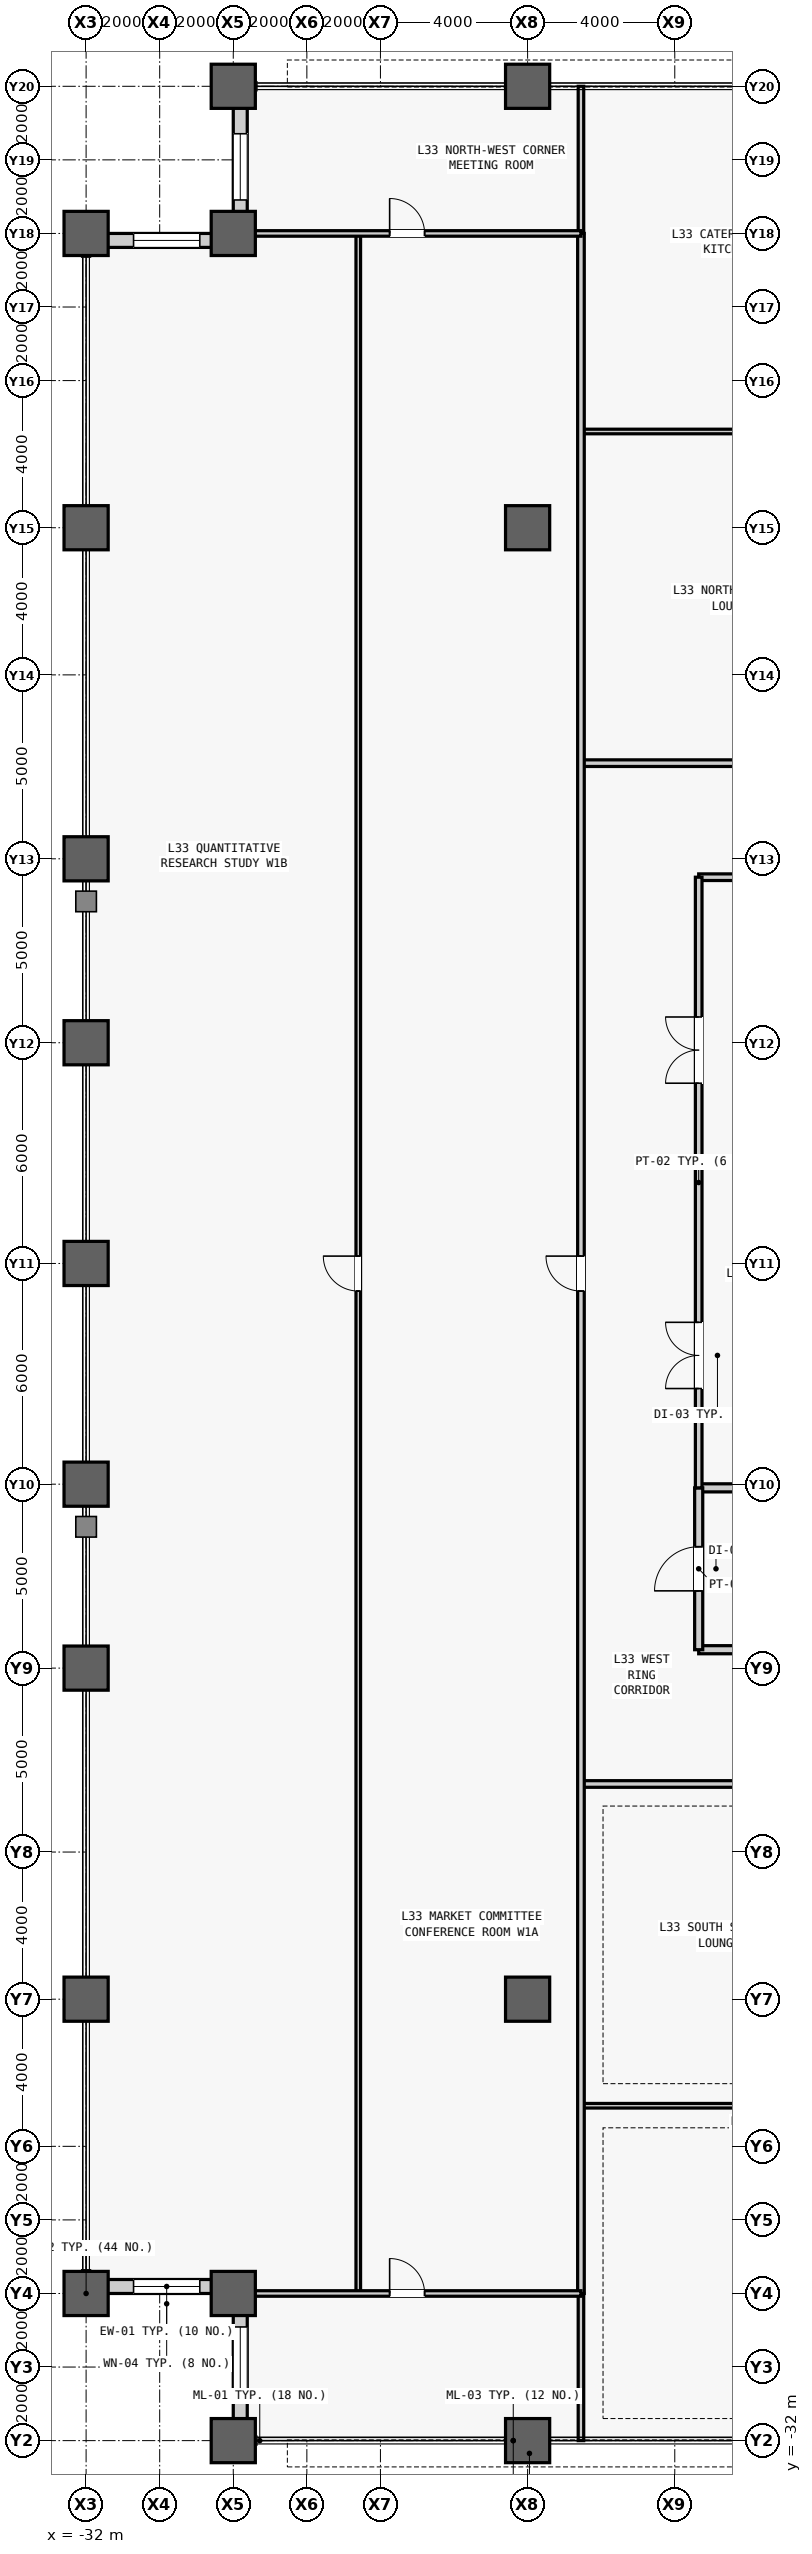
"""IFC4 building model, lengths in metres.
Left out: names, types, materials, properties, quantities, classifications, styles, units other than length and angle.
Written with IfcOpenShell. Run it as: python <this file> out.ifc"""

import sys

from ifc_helpers import new_model, si_unit, direction, frame, frame_2d, origin, origin_2d, place, context, subcontext, project, spatial, rectangle, hollow_rectangle, extrude, source, transform, mapped, element, fill, save


model = new_model("IFC4")
c1 = context("Model", 3, precision=1e-05, world=origin(), true_north=direction((0.0, 1.0)))
c2 = subcontext(c1, "Body", "Model", "MODEL_VIEW")
j1 = project(units=[si_unit("LENGTHUNIT", "METRE"), si_unit("PLANEANGLEUNIT", "RADIAN")], contexts=[c1])
p1 = place(None, origin())
s1 = spatial("IfcSite", under=j1, at=p1, CompositionType="ELEMENT")
p2 = place(p1, origin())
s2 = spatial("IfcBuilding", under=s1, at=p2, CompositionType="ELEMENT")
p3 = place(p2, frame((0.0, 0.0, 144.7)))
s3 = spatial("IfcBuildingStorey", under=s2, at=p3, CompositionType="ELEMENT", Elevation=144.7)
m1 = source(origin(), c2, "Body", "SweptSolid", [
    extrude(hollow_rectangle(XDim=1.2, YDim=1.2, WallThickness=0.07, at=origin_2d()), origin(), (0.0, 0.0, 1.0), 5.2),
])
for number, where, z_axis, x_axis in (
    (1, (-32.0, -28.0, 0.0), (0.0, 0.0, 1.0), (1.0, 0.0, 0.0)),
    (2, (-32.0, -20.0, 0.0), (0.0, 0.0, 1.0), (1.0, 0.0, 0.0)),
    (3, (-32.0, -11.0, 0.0), (0.0, 0.0, 1.0), (1.0, 0.0, 0.0)),
    (4, (-32.0, -6.0, 0.0), (0.0, 0.0, 1.0), (1.0, 0.0, 0.0)),
    (5, (-32.0, 0.0, 0.0), (0.0, 0.0, 1.0), (1.0, 0.0, 0.0)),
    (6, (-32.0, 6.0, 0.0), (0.0, 0.0, 1.0), (1.0, 0.0, 0.0)),
    (7, (-32.0, 11.0, 0.0), (0.0, 0.0, 1.0), (1.0, 0.0, 0.0)),
    (8, (-32.0, 20.0, 0.0), (0.0, 0.0, 1.0), (1.0, 0.0, 0.0)),
    (9, (-32.0, 28.0, 0.0), (0.0, 0.0, 1.0), (1.0, 0.0, 0.0)),
    (10, (-28.0, -32.0, 0.0), (0.0, 0.0, 1.0), (1.0, 0.0, 0.0)),
    (11, (-28.0, -28.0, 0.0), (0.0, 0.0, 1.0), (1.0, 0.0, 0.0)),
    (12, (-28.0, 28.0, 0.0), (0.0, 0.0, 1.0), (1.0, 0.0, 0.0)),
    (13, (-28.0, 32.0, 0.0), (0.0, 0.0, 1.0), (1.0, 0.0, 0.0)),
    (14, (-20.0, -32.0, 0.0), (0.0, 0.0, 1.0), (1.0, 0.0, 0.0)),
    (15, (-20.0, -20.0, 0.0), (0.0, 0.0, 1.0), (1.0, 0.0, 0.0)),
    (16, (-20.0, 20.0, 0.0), (0.0, 0.0, 1.0), (1.0, 0.0, 0.0)),
    (17, (-20.0, 32.0, 0.0), (0.0, 0.0, 1.0), (1.0, 0.0, 0.0)),
):
    element("IfcColumn", number, at=place(p3, frame(where, z_axis=z_axis, x_axis=x_axis)), inside=s3, PredefinedType="COLUMN", context=c2, shape_type="MappedRepresentation", body=[
        mapped(m1, transform((0.0, 0.0, 0.0), scale=1.0)),
    ])
m2 = source(origin(), c2, "Body", "SweptSolid", [
    extrude(rectangle(XDim=3.62, YDim=0.38, at=frame_2d((1.81, 0.0))), origin(), (0.0, 0.0, 1.0), 3.905),
])
p4 = place(p3, frame((-28.0, -27.81, 0.0), z_axis=(0.0, 0.0, 1.0), x_axis=(-1.0, 0.0, 0.0)))
e18 = element("IfcWall", 18, at=p4, inside=s3, PredefinedType="STANDARD", context=c2, shape_type="MappedRepresentation", body=[
    mapped(m2, transform((0.0, 0.0, 0.0), scale=1.0)),
])
m3 = source(origin(), c2, "Body", "SweptSolid", [
    extrude(rectangle(XDim=1.8, YDim=2.4, at=frame_2d((0.9, 1.2))), frame((0.0, 0.2, 0.0), z_axis=(0.0, -1.0, 0.0), x_axis=(1.0, 0.0, 0.0)), (0.0, 0.0, 1.0), 0.4),
])
p5 = place(p4, frame((0.91, 0.0, 0.7)))
e19 = element("IfcOpeningElement", 19, at=p5, cuts=e18, PredefinedType="OPENING", context=c2, shape_type="MappedRepresentation", body=[
    mapped(m3, transform((0.0, 0.0, 0.0), scale=1.0)),
])
p6 = place(p3, frame((-27.81, -31.62, 0.0), z_axis=(0.0, 0.0, 1.0), x_axis=(0.0, 1.0, 0.0)))
e20 = element("IfcWall", 20, at=p6, inside=s3, PredefinedType="STANDARD", context=c2, shape_type="MappedRepresentation", body=[
    mapped(m2, transform((0.0, 0.0, 0.0), scale=1.0)),
])
p7 = place(p6, frame((0.91, 0.0, 0.7)))
e21 = element("IfcOpeningElement", 21, at=p7, cuts=e20, PredefinedType="OPENING", context=c2, shape_type="MappedRepresentation", body=[
    mapped(m3, transform((0.0, 0.0, 0.0), scale=1.0)),
])
p8 = place(p3, frame((-27.81, 28.0, 0.0), z_axis=(0.0, 0.0, 1.0), x_axis=(0.0, 1.0, 0.0)))
e22 = element("IfcWall", 22, at=p8, inside=s3, PredefinedType="STANDARD", context=c2, shape_type="MappedRepresentation", body=[
    mapped(m2, transform((0.0, 0.0, 0.0), scale=1.0)),
])
p9 = place(p8, frame((0.91, 0.0, 0.7)))
e23 = element("IfcOpeningElement", 23, at=p9, cuts=e22, PredefinedType="OPENING", context=c2, shape_type="MappedRepresentation", body=[
    mapped(m3, transform((0.0, 0.0, 0.0), scale=1.0)),
])
p10 = place(p3, frame((-28.0, 27.81, 0.0), z_axis=(0.0, 0.0, 1.0), x_axis=(-1.0, 0.0, 0.0)))
e24 = element("IfcWall", 24, at=p10, inside=s3, PredefinedType="STANDARD", context=c2, shape_type="MappedRepresentation", body=[
    mapped(m2, transform((0.0, 0.0, 0.0), scale=1.0)),
])
p11 = place(p10, frame((0.91, 0.0, 0.7)))
e25 = element("IfcOpeningElement", 25, at=p11, cuts=e24, PredefinedType="OPENING", context=c2, shape_type="MappedRepresentation", body=[
    mapped(m3, transform((0.0, 0.0, 0.0), scale=1.0)),
])
m4 = source(origin(), c2, "Body", "SweptSolid", [
    extrude(rectangle(XDim=4.05, YDim=0.22, at=frame_2d((2.025, 0.0))), origin(), (0.0, 0.0, 1.0), 4.6),
])
p12 = place(p3, frame((-15.35, -10.5, 0.0), z_axis=(0.0, 0.0, 1.0), x_axis=(1.0, 0.0, 0.0)))
e26 = element("IfcWall", 26, at=p12, inside=s3, PredefinedType="PARTITIONING", context=c2, shape_type="MappedRepresentation", body=[
    mapped(m4, transform((0.0, 0.0, 0.0), scale=1.0)),
])
m5 = source(origin(), c2, "Body", "SweptSolid", [
    extrude(rectangle(XDim=4.05, YDim=0.22, at=frame_2d((2.025, 0.0))), origin(), (0.0, 0.0, 1.0), 2.8),
])
p13 = place(p3, frame((-15.35, -6.1, 0.0), z_axis=(0.0, 0.0, 1.0), x_axis=(1.0, 0.0, 0.0)))
e27 = element("IfcWall", 27, at=p13, inside=s3, PredefinedType="PARTITIONING", context=c2, shape_type="MappedRepresentation", body=[
    mapped(m5, transform((0.0, 0.0, 0.0), scale=1.0)),
])
m6 = source(origin(), c2, "Body", "SweptSolid", [
    extrude(rectangle(XDim=4.4, YDim=0.22, at=frame_2d((2.2, 0.0))), origin(), (0.0, 0.0, 1.0), 4.6),
])
p14 = place(p3, frame((-15.35, -10.5, 0.0), z_axis=(0.0, 0.0, 1.0), x_axis=(0.0, 1.0, 0.0)))
e28 = element("IfcWall", 28, at=p14, inside=s3, PredefinedType="PARTITIONING", context=c2, shape_type="MappedRepresentation", body=[
    mapped(m6, transform((0.0, 0.0, 0.0), scale=1.0)),
])
m7 = source(origin(), c2, "Body", "SweptSolid", [
    extrude(rectangle(XDim=1.2, YDim=2.2, at=frame_2d((0.6, 1.1))), frame((0.0, 0.12, 0.0), z_axis=(0.0, -1.0, 0.0), x_axis=(1.0, 0.0, 0.0)), (0.0, 0.0, 1.0), 0.24),
])
p15 = place(p14, frame((1.6, 0.0, 0.0)))
e29 = element("IfcOpeningElement", 29, at=p15, cuts=e28, PredefinedType="OPENING", context=c2, shape_type="MappedRepresentation", body=[
    mapped(m7, transform((0.0, 0.0, 0.0), scale=1.0)),
])
m8 = source(origin(), c2, "Body", "SweptSolid", [
    extrude(rectangle(XDim=4.05, YDim=0.18, at=frame_2d((2.025, 0.0))), origin(), (0.0, 0.0, 1.0), 4.6),
])
p16 = place(p3, frame((-15.35, 10.5, 0.0), z_axis=(0.0, 0.0, 1.0), x_axis=(1.0, 0.0, 0.0)))
e30 = element("IfcWall", 30, at=p16, inside=s3, PredefinedType="PARTITIONING", context=c2, shape_type="MappedRepresentation", body=[
    mapped(m8, transform((0.0, 0.0, 0.0), scale=1.0)),
])
m9 = source(origin(), c2, "Body", "SweptSolid", [
    extrude(rectangle(XDim=16.6, YDim=0.18, at=frame_2d((8.3, 0.0))), origin(), (0.0, 0.0, 1.0), 4.6),
])
p17 = place(p3, frame((-15.35, -6.1, 0.0), z_axis=(0.0, 0.0, 1.0), x_axis=(0.0, 1.0, 0.0)))
e31 = element("IfcWall", 31, at=p17, inside=s3, PredefinedType="PARTITIONING", context=c2, shape_type="MappedRepresentation", body=[
    mapped(m9, transform((0.0, 0.0, 0.0), scale=1.0)),
])
m10 = source(origin(), c2, "Body", "SweptSolid", [
    extrude(rectangle(XDim=1.8, YDim=2.25, at=frame_2d((0.9, 1.125))), frame((0.0, 0.1, 0.0), z_axis=(0.0, -1.0, 0.0), x_axis=(1.0, 0.0, 0.0)), (0.0, 0.0, 1.0), 0.2),
])
p18 = place(p17, frame((2.7, 0.0, 0.0)))
e32 = element("IfcOpeningElement", 32, at=p18, cuts=e31, PredefinedType="OPENING", context=c2, shape_type="MappedRepresentation", body=[
    mapped(m10, transform((0.0, 0.0, 0.0), scale=1.0)),
])
p19 = place(p17, frame((11.0, 0.0, 0.0)))
e33 = element("IfcOpeningElement", 33, at=p19, cuts=e31, PredefinedType="OPENING", context=c2, shape_type="MappedRepresentation", body=[
    mapped(m10, transform((0.0, 0.0, 0.0), scale=1.0)),
])
m11 = source(origin(), c2, "Body", "SweptSolid", [
    extrude(rectangle(XDim=13.282, YDim=0.125, at=frame_2d((6.641, 0.0))), origin(), (0.0, 0.0, 1.0), 4.6),
])
p20 = place(p3, frame((-18.55, -22.896, 0.0), z_axis=(0.0, 0.0, 1.0), x_axis=(1.0, 0.0, 0.0)))
e34 = element("IfcWall", 34, at=p20, inside=s3, PredefinedType="PARTITIONING", context=c2, shape_type="MappedRepresentation", body=[
    mapped(m11, transform((0.0, 0.0, 0.0), scale=1.0)),
])
m12 = source(origin(), c2, "Body", "SweptSolid", [
    extrude(rectangle(XDim=0.95, YDim=2.15, at=frame_2d((0.475, 1.075))), frame((0.0, 0.073, 0.0), z_axis=(0.0, -1.0, 0.0), x_axis=(1.0, 0.0, 0.0)), (0.0, 0.0, 1.0), 0.145),
])
p21 = place(p20, frame((6.166, 0.0, 0.0)))
e35 = element("IfcOpeningElement", 35, at=p21, cuts=e34, PredefinedType="OPENING", context=c2, shape_type="MappedRepresentation", body=[
    mapped(m12, transform((0.0, 0.0, 0.0), scale=1.0)),
])
m13 = source(origin(), c2, "Body", "SweptSolid", [
    extrude(rectangle(XDim=37.95, YDim=0.18, at=frame_2d((18.975, 0.0))), origin(), (0.0, 0.0, 1.0), 4.6),
])
p22 = place(p3, frame((-18.55, -14.15, 0.0), z_axis=(0.0, 0.0, 1.0), x_axis=(1.0, 0.0, 0.0)))
e36 = element("IfcWall", 36, at=p22, inside=s3, PredefinedType="PARTITIONING", context=c2, shape_type="MappedRepresentation", body=[
    mapped(m13, transform((0.0, 0.0, 0.0), scale=1.0)),
])
m14 = source(origin(), c2, "Body", "SweptSolid", [
    extrude(rectangle(XDim=1.05, YDim=2.2, at=frame_2d((0.525, 1.1))), frame((0.0, 0.1, 0.0), z_axis=(0.0, -1.0, 0.0), x_axis=(1.0, 0.0, 0.0)), (0.0, 0.0, 1.0), 0.2),
])
p23 = place(p22, frame((8.191, 0.0, 0.0)))
e37 = element("IfcOpeningElement", 37, at=p23, cuts=e36, PredefinedType="OPENING", context=c2, shape_type="MappedRepresentation", body=[
    mapped(m14, transform((0.0, 0.0, 0.0), scale=1.0)),
])
p24 = place(p22, frame((19.399, 0.0, 0.0)))
e38 = element("IfcOpeningElement", 38, at=p24, cuts=e36, PredefinedType="OPENING", context=c2, shape_type="MappedRepresentation", body=[
    mapped(m14, transform((0.0, 0.0, 0.0), scale=1.0)),
])
p25 = place(p22, frame((29.232, 0.0, 0.0)))
e39 = element("IfcOpeningElement", 39, at=p25, cuts=e36, PredefinedType="OPENING", context=c2, shape_type="MappedRepresentation", body=[
    mapped(m14, transform((0.0, 0.0, 0.0), scale=1.0)),
])
m15 = source(origin(), c2, "Body", "SweptSolid", [
    extrude(rectangle(XDim=12.144, YDim=0.125, at=frame_2d((6.072, 0.0))), origin(), (0.0, 0.0, 1.0), 4.6),
])
p26 = place(p3, frame((-18.55, 22.616, 0.0), z_axis=(0.0, 0.0, 1.0), x_axis=(1.0, 0.0, 0.0)))
e40 = element("IfcWall", 40, at=p26, inside=s3, PredefinedType="PARTITIONING", context=c2, shape_type="MappedRepresentation", body=[
    mapped(m15, transform((0.0, 0.0, 0.0), scale=1.0)),
])
p27 = place(p26, frame((5.597, 0.0, 0.0)))
e41 = element("IfcOpeningElement", 41, at=p27, cuts=e40, PredefinedType="OPENING", context=c2, shape_type="MappedRepresentation", body=[
    mapped(m12, transform((0.0, 0.0, 0.0), scale=1.0)),
])
p28 = place(p3, frame((-18.55, 13.6, 0.0), z_axis=(0.0, 0.0, 1.0), x_axis=(1.0, 0.0, 0.0)))
e42 = element("IfcWall", 42, at=p28, inside=s3, PredefinedType="PARTITIONING", context=c2, shape_type="MappedRepresentation", body=[
    mapped(m13, transform((0.0, 0.0, 0.0), scale=1.0)),
])
p29 = place(p28, frame((7.622, 0.0, 0.0)))
e43 = element("IfcOpeningElement", 43, at=p29, cuts=e42, PredefinedType="OPENING", context=c2, shape_type="MappedRepresentation", body=[
    mapped(m14, transform((0.0, 0.0, 0.0), scale=1.0)),
])
p30 = place(p28, frame((18.071, 0.0, 0.0)))
e44 = element("IfcOpeningElement", 44, at=p30, cuts=e42, PredefinedType="OPENING", context=c2, shape_type="MappedRepresentation", body=[
    mapped(m14, transform((0.0, 0.0, 0.0), scale=1.0)),
])
p31 = place(p28, frame((28.473, 0.0, 0.0)))
e45 = element("IfcOpeningElement", 45, at=p31, cuts=e42, PredefinedType="OPENING", context=c2, shape_type="MappedRepresentation", body=[
    mapped(m14, transform((0.0, 0.0, 0.0), scale=1.0)),
])
m16 = source(origin(), c2, "Body", "SweptSolid", [
    extrude(rectangle(XDim=4.0, YDim=0.15, at=frame_2d((2.0, 0.0))), origin(), (0.0, 0.0, 1.0), 4.6),
])
for number, where, z_axis, x_axis in (
    (46, (-18.55, -32.0, 0.0), (0.0, 0.0, 1.0), (0.0, 1.0, 0.0)),
    (47, (-18.55, 28.0, 0.0), (0.0, 0.0, 1.0), (0.0, 1.0, 0.0)),
):
    element("IfcWall", number, at=place(p3, frame(where, z_axis=z_axis, x_axis=x_axis)), inside=s3, PredefinedType="PARTITIONING", context=c2, shape_type="MappedRepresentation", body=[
        mapped(m16, transform((0.0, 0.0, 0.0), scale=1.0)),
    ])
m17 = source(origin(), c2, "Body", "SweptSolid", [
    extrude(rectangle(XDim=56.0, YDim=0.125, at=frame_2d((28.0, 0.0))), origin(), (0.0, 0.0, 1.0), 4.6),
])
p32 = place(p3, frame((-24.603, -28.0, 0.0), z_axis=(0.0, 0.0, 1.0), x_axis=(0.0, 1.0, 0.0)))
e48 = element("IfcWall", 48, at=p32, inside=s3, PredefinedType="PARTITIONING", context=c2, shape_type="MappedRepresentation", body=[
    mapped(m17, transform((0.0, 0.0, 0.0), scale=1.0)),
])
p33 = place(p32, frame((27.25, 0.0, 0.0)))
e49 = element("IfcOpeningElement", 49, at=p33, cuts=e48, PredefinedType="OPENING", context=c2, shape_type="MappedRepresentation", body=[
    mapped(m12, transform((0.0, 0.0, 0.0), scale=1.0)),
])
m18 = source(origin(), c2, "Body", "SweptSolid", [
    extrude(rectangle(XDim=56.0, YDim=0.18, at=frame_2d((28.0, 0.0))), origin(), (0.0, 0.0, 1.0), 4.6),
])
p34 = place(p3, frame((-18.55, -28.0, 0.0), z_axis=(0.0, 0.0, 1.0), x_axis=(0.0, 1.0, 0.0)))
e50 = element("IfcWall", 50, at=p34, inside=s3, PredefinedType="PARTITIONING", context=c2, shape_type="MappedRepresentation", body=[
    mapped(m18, transform((0.0, 0.0, 0.0), scale=1.0)),
])
m19 = source(origin(), c2, "Body", "SweptSolid", [
    extrude(rectangle(XDim=0.95, YDim=2.15, at=frame_2d((0.475, 1.075))), frame((0.0, 0.1, 0.0), z_axis=(0.0, -1.0, 0.0), x_axis=(1.0, 0.0, 0.0)), (0.0, 0.0, 1.0), 0.2),
])
p35 = place(p34, frame((27.25, 0.0, 0.0)))
e51 = element("IfcOpeningElement", 51, at=p35, cuts=e50, PredefinedType="OPENING", context=c2, shape_type="MappedRepresentation", body=[
    mapped(m19, transform((0.0, 0.0, 0.0), scale=1.0)),
])
m20 = source(origin(), c2, "Body", "SweptSolid", [
    extrude(rectangle(XDim=9.45, YDim=0.15, at=frame_2d((4.725, 0.0))), origin(), (0.0, 0.0, 1.0), 4.6),
])
p36 = place(p3, frame((-28.0, -28.0, 0.0), z_axis=(0.0, 0.0, 1.0), x_axis=(1.0, 0.0, 0.0)))
e52 = element("IfcWall", 52, at=p36, inside=s3, PredefinedType="PARTITIONING", context=c2, shape_type="MappedRepresentation", body=[
    mapped(m20, transform((0.0, 0.0, 0.0), scale=1.0)),
])
m21 = source(origin(), c2, "Body", "SweptSolid", [
    extrude(rectangle(XDim=0.95, YDim=2.15, at=frame_2d((0.475, 1.075))), frame((0.0, 0.085, 0.0), z_axis=(0.0, -1.0, 0.0), x_axis=(1.0, 0.0, 0.0)), (0.0, 0.0, 1.0), 0.17),
])
p37 = place(p36, frame((4.25, 0.0, 0.0)))
e53 = element("IfcOpeningElement", 53, at=p37, cuts=e52, PredefinedType="OPENING", context=c2, shape_type="MappedRepresentation", body=[
    mapped(m21, transform((0.0, 0.0, 0.0), scale=1.0)),
])
p38 = place(p3, frame((-28.0, 28.0, 0.0), z_axis=(0.0, 0.0, 1.0), x_axis=(1.0, 0.0, 0.0)))
e54 = element("IfcWall", 54, at=p38, inside=s3, PredefinedType="PARTITIONING", context=c2, shape_type="MappedRepresentation", body=[
    mapped(m20, transform((0.0, 0.0, 0.0), scale=1.0)),
])
p39 = place(p38, frame((4.25, 0.0, 0.0)))
e55 = element("IfcOpeningElement", 55, at=p39, cuts=e54, PredefinedType="OPENING", context=c2, shape_type="MappedRepresentation", body=[
    mapped(m21, transform((0.0, 0.0, 0.0), scale=1.0)),
])
m22 = source(origin(), c2, "Body", "SweptSolid", [
    extrude(rectangle(XDim=1.8, YDim=2.4, at=frame_2d((0.9, 1.2))), frame((0.0, 0.03, 0.0), z_axis=(0.0, -1.0, 0.0), x_axis=(1.0, 0.0, 0.0)), (0.0, 0.0, 1.0), 0.06),
])
p40 = place(p5, origin())
e56 = element("IfcWindow", 56, at=p40, inside=s3, PartitioningType="SINGLE_PANEL", PredefinedType="WINDOW", context=c2, shape_type="MappedRepresentation", body=[
    mapped(m22, transform((0.0, 0.0, 0.0), scale=1.0)),
])
fill(e19, e56)
p41 = place(p7, origin())
e57 = element("IfcWindow", 57, at=p41, inside=s3, PartitioningType="SINGLE_PANEL", PredefinedType="WINDOW", context=c2, shape_type="MappedRepresentation", body=[
    mapped(m22, transform((0.0, 0.0, 0.0), scale=1.0)),
])
fill(e21, e57)
p42 = place(p9, origin())
e58 = element("IfcWindow", 58, at=p42, inside=s3, PartitioningType="SINGLE_PANEL", PredefinedType="WINDOW", context=c2, shape_type="MappedRepresentation", body=[
    mapped(m22, transform((0.0, 0.0, 0.0), scale=1.0)),
])
fill(e23, e58)
p43 = place(p11, origin())
e59 = element("IfcWindow", 59, at=p43, inside=s3, PartitioningType="SINGLE_PANEL", PredefinedType="WINDOW", context=c2, shape_type="MappedRepresentation", body=[
    mapped(m22, transform((0.0, 0.0, 0.0), scale=1.0)),
])
fill(e25, e59)
m23 = source(origin(), c2, "Body", "SweptSolid", [
    extrude(rectangle(XDim=1.2, YDim=2.2, at=frame_2d((0.6, 1.1))), frame((0.0, 0.025, 0.0), z_axis=(0.0, -1.0, 0.0), x_axis=(1.0, 0.0, 0.0)), (0.0, 0.0, 1.0), 0.05),
])
p44 = place(p15, origin())
e60 = element("IfcDoor", 60, at=p44, inside=s3, OperationType="SINGLE_SWING_LEFT", PredefinedType="DOOR", context=c2, shape_type="MappedRepresentation", body=[
    mapped(m23, transform((0.0, 0.0, 0.0), scale=1.0)),
])
fill(e29, e60)
m24 = source(origin(), c2, "Body", "SweptSolid", [
    extrude(rectangle(XDim=1.8, YDim=2.25, at=frame_2d((0.9, 1.125))), frame((0.0, 0.025, 0.0), z_axis=(0.0, -1.0, 0.0), x_axis=(1.0, 0.0, 0.0)), (0.0, 0.0, 1.0), 0.05),
])
p45 = place(p18, origin())
e61 = element("IfcDoor", 61, at=p45, inside=s3, OperationType="SINGLE_SWING_LEFT", PredefinedType="DOOR", context=c2, shape_type="MappedRepresentation", body=[
    mapped(m24, transform((0.0, 0.0, 0.0), scale=1.0)),
])
fill(e32, e61)
p46 = place(p19, origin())
e62 = element("IfcDoor", 62, at=p46, inside=s3, OperationType="SINGLE_SWING_RIGHT", PredefinedType="DOOR", context=c2, shape_type="MappedRepresentation", body=[
    mapped(m24, transform((0.0, 0.0, 0.0), scale=1.0)),
])
fill(e33, e62)
m25 = source(origin(), c2, "Body", "SweptSolid", [
    extrude(rectangle(XDim=0.95, YDim=2.15, at=frame_2d((0.475, 1.075))), frame((0.0, 0.025, 0.0), z_axis=(0.0, -1.0, 0.0), x_axis=(1.0, 0.0, 0.0)), (0.0, 0.0, 1.0), 0.05),
])
p47 = place(p33, origin())
e63 = element("IfcDoor", 63, at=p47, inside=s3, OperationType="SINGLE_SWING_RIGHT", PredefinedType="DOOR", context=c2, shape_type="MappedRepresentation", body=[
    mapped(m25, transform((0.0, 0.0, 0.0), scale=1.0)),
])
fill(e49, e63)
p48 = place(p35, origin())
e64 = element("IfcDoor", 64, at=p48, inside=s3, OperationType="SINGLE_SWING_RIGHT", PredefinedType="DOOR", context=c2, shape_type="MappedRepresentation", body=[
    mapped(m25, transform((0.0, 0.0, 0.0), scale=1.0)),
])
fill(e51, e64)
p49 = place(p37, origin())
e65 = element("IfcDoor", 65, at=p49, inside=s3, OperationType="SINGLE_SWING_LEFT", PredefinedType="DOOR", context=c2, shape_type="MappedRepresentation", body=[
    mapped(m25, transform((0.0, 0.0, 0.0), scale=1.0)),
])
fill(e53, e65)
p50 = place(p39, origin())
e66 = element("IfcDoor", 66, at=p50, inside=s3, OperationType="SINGLE_SWING_LEFT", PredefinedType="DOOR", context=c2, shape_type="MappedRepresentation", body=[
    mapped(m25, transform((0.0, 0.0, 0.0), scale=1.0)),
])
fill(e55, e66)
save(model, sys.argv[1])
